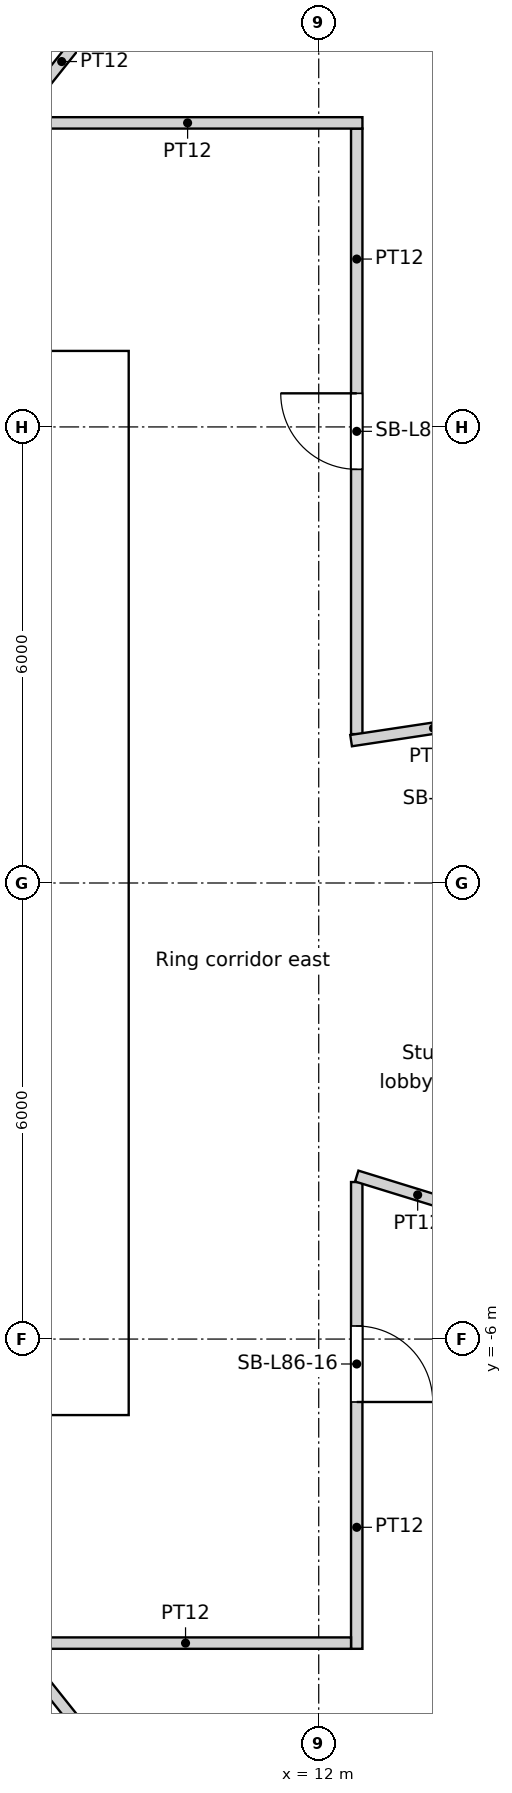
"""IFC4 building model, lengths in metres.
Left out: names, types, materials, properties, quantities, classifications, styles, units other than length and angle.
Written with IfcOpenShell. Run it as: python <this file> out.ifc"""

import sys

from ifc_helpers import new_model, si_unit, direction, frame, frame_2d, origin, place, context, subcontext, project, spatial, rectangle, extrude, element, fill, save


model = new_model("IFC4")
c1 = context("Model", 3, precision=1e-05, world=origin(), true_north=direction((0.0, 1.0)))
c2 = subcontext(c1, "Body", "Model", "MODEL_VIEW")
j1 = project(units=[si_unit("LENGTHUNIT", "METRE"), si_unit("PLANEANGLEUNIT", "RADIAN")], contexts=[c1])
p1 = place(None, origin())
s1 = spatial("IfcSite", under=j1, at=p1, CompositionType="ELEMENT")
p2 = place(p1, origin())
s2 = spatial("IfcBuilding", under=s1, at=p2, CompositionType="ELEMENT")
p3 = place(p2, frame((0.0, 0.0, 330.6)))
s3 = spatial("IfcBuildingStorey", under=s2, at=p3, CompositionType="ELEMENT", Elevation=330.6)
p4 = place(p3, frame((-9.5, -6.7, 0.0), z_axis=(0.0, 0.0, 1.0), x_axis=(1.0, 0.0, 0.0)))
e1 = element("IfcWall", 1, at=p4, inside=s3, PredefinedType="SOLIDWALL", context=c2, shape_type="SweptSolid", body=[
    extrude(rectangle(XDim=19.0, YDim=0.6, at=frame_2d((9.5, 0.0))), origin(), (0.0, 0.0, 1.0), 5.4),
])
p5 = place(p4, frame((10.4, 0.0, 0.0)))
e2 = element("IfcOpeningElement", 2, at=p5, cuts=e1, PredefinedType="OPENING", context=c2, shape_type="SweptSolid", body=[
    extrude(rectangle(XDim=1.0, YDim=2.1, at=frame_2d((0.5, 1.05))), frame((0.0, 0.3, 0.0), z_axis=(0.0, -1.0, 0.0), x_axis=(1.0, 0.0, 0.0)), (0.0, 0.0, 1.0), 0.6),
])
p6 = place(p4, frame((5.35, 0.0, 0.0)))
e3 = element("IfcOpeningElement", 3, at=p6, cuts=e1, PredefinedType="OPENING", context=c2, shape_type="SweptSolid", body=[
    extrude(rectangle(XDim=1.7, YDim=2.1, at=frame_2d((0.85, 1.05))), frame((0.0, 0.3, 0.0), z_axis=(0.0, -1.0, 0.0), x_axis=(1.0, 0.0, 0.0)), (0.0, 0.0, 1.0), 0.6),
])
p7 = place(p4, frame((11.95, 0.0, 0.0)))
e4 = element("IfcOpeningElement", 4, at=p7, cuts=e1, PredefinedType="OPENING", context=c2, shape_type="SweptSolid", body=[
    extrude(rectangle(XDim=1.7, YDim=2.1, at=frame_2d((0.85, 1.05))), frame((0.0, 0.3, 0.0), z_axis=(0.0, -1.0, 0.0), x_axis=(1.0, 0.0, 0.0)), (0.0, 0.0, 1.0), 0.6),
])
p8 = place(p3, frame((-9.5, 6.7, 0.0), z_axis=(0.0, 0.0, 1.0), x_axis=(1.0, 0.0, 0.0)))
e5 = element("IfcWall", 5, at=p8, inside=s3, PredefinedType="SOLIDWALL", context=c2, shape_type="SweptSolid", body=[
    extrude(rectangle(XDim=19.0, YDim=0.6, at=frame_2d((9.5, 0.0))), origin(), (0.0, 0.0, 1.0), 5.4),
])
p9 = place(p8, frame((5.35, 0.0, 0.0)))
e6 = element("IfcOpeningElement", 6, at=p9, cuts=e5, PredefinedType="OPENING", context=c2, shape_type="SweptSolid", body=[
    extrude(rectangle(XDim=1.7, YDim=2.1, at=frame_2d((0.85, 1.05))), frame((0.0, 0.3, 0.0), z_axis=(0.0, -1.0, 0.0), x_axis=(1.0, 0.0, 0.0)), (0.0, 0.0, 1.0), 0.6),
])
p10 = place(p3, frame((9.2, -6.4, 0.0), z_axis=(0.0, 0.0, 1.0), x_axis=(0.0, 1.0, 0.0)))
e7 = element("IfcWall", 7, at=p10, inside=s3, PredefinedType="SOLIDWALL", context=c2, shape_type="SweptSolid", body=[
    extrude(rectangle(XDim=12.8, YDim=0.6, at=frame_2d((6.4, 0.0))), origin(), (0.0, 0.0, 1.0), 5.4),
])
p11 = place(p10, frame((6.4, 0.0, 0.0)))
e8 = element("IfcOpeningElement", 8, at=p11, cuts=e7, PredefinedType="OPENING", context=c2, shape_type="SweptSolid", body=[
    extrude(rectangle(XDim=1.8, YDim=2.1, at=frame_2d((0.9, 1.05))), frame((0.0, 0.3, 0.0), z_axis=(0.0, -1.0, 0.0), x_axis=(1.0, 0.0, 0.0)), (0.0, 0.0, 1.0), 0.6),
])
p12 = place(p3, frame((2.1, -3.1, 0.0), z_axis=(0.0, 0.0, 1.0), x_axis=(1.0, 0.0, 0.0)))
e9 = element("IfcWall", 9, at=p12, inside=s3, PredefinedType="SOLIDWALL", context=c2, shape_type="SweptSolid", body=[
    extrude(rectangle(XDim=6.8, YDim=0.3, at=frame_2d((3.4, 0.0))), origin(), (0.0, 0.0, 1.0), 5.05),
])
p13 = place(p12, frame((0.35, 0.0, 0.0)))
e10 = element("IfcOpeningElement", 10, at=p13, cuts=e9, PredefinedType="OPENING", context=c2, shape_type="SweptSolid", body=[
    extrude(rectangle(XDim=1.7, YDim=2.1, at=frame_2d((0.85, 1.05))), frame((0.0, 0.15, 0.0), z_axis=(0.0, -1.0, 0.0), x_axis=(1.0, 0.0, 0.0)), (0.0, 0.0, 1.0), 0.3),
])
p14 = place(p3, frame((-4.35, 3.1, 0.0), z_axis=(0.0, 0.0, 1.0), x_axis=(1.0, 0.0, 0.0)))
e11 = element("IfcWall", 11, at=p14, inside=s3, PredefinedType="SOLIDWALL", context=c2, shape_type="SweptSolid", body=[
    extrude(rectangle(XDim=13.25, YDim=0.3, at=frame_2d((6.625, 0.0))), origin(), (0.0, 0.0, 1.0), 5.05),
])
p15 = place(p14, frame((2.95, 0.0, 0.0)))
e12 = element("IfcOpeningElement", 12, at=p15, cuts=e11, PredefinedType="OPENING", context=c2, shape_type="SweptSolid", body=[
    extrude(rectangle(XDim=1.1, YDim=2.1, at=frame_2d((0.55, 1.05))), frame((0.0, 0.15, 0.0), z_axis=(0.0, -1.0, 0.0), x_axis=(1.0, 0.0, 0.0)), (0.0, 0.0, 1.0), 0.3),
])
p16 = place(p14, frame((5.75, 0.0, 0.0)))
e13 = element("IfcOpeningElement", 13, at=p16, cuts=e11, PredefinedType="OPENING", context=c2, shape_type="SweptSolid", body=[
    extrude(rectangle(XDim=1.1, YDim=2.1, at=frame_2d((0.55, 1.05))), frame((0.0, 0.15, 0.0), z_axis=(0.0, -1.0, 0.0), x_axis=(1.0, 0.0, 0.0)), (0.0, 0.0, 1.0), 0.3),
])
p17 = place(p14, frame((8.55, 0.0, 0.0)))
e14 = element("IfcOpeningElement", 14, at=p17, cuts=e11, PredefinedType="OPENING", context=c2, shape_type="SweptSolid", body=[
    extrude(rectangle(XDim=1.1, YDim=2.1, at=frame_2d((0.55, 1.05))), frame((0.0, 0.15, 0.0), z_axis=(0.0, -1.0, 0.0), x_axis=(1.0, 0.0, 0.0)), (0.0, 0.0, 1.0), 0.3),
])
p18 = place(p3, frame((5.85, -0.425, 0.0), z_axis=(0.0, 0.0, 1.0), x_axis=(1.0, 0.0, 0.0)))
e15 = element("IfcWall", 15, at=p18, inside=s3, PredefinedType="SOLIDWALL", context=c2, shape_type="SweptSolid", body=[
    extrude(rectangle(XDim=3.05, YDim=0.15, at=frame_2d((1.525, 0.0))), origin(), (0.0, 0.0, 1.0), 5.05),
])
p19 = place(p18, frame((0.525, 0.0, 0.0)))
e16 = element("IfcOpeningElement", 16, at=p19, cuts=e15, PredefinedType="OPENING", context=c2, shape_type="SweptSolid", body=[
    extrude(rectangle(XDim=0.9, YDim=2.1, at=frame_2d((0.45, 1.05))), frame((0.0, 0.075, 0.0), z_axis=(0.0, -1.0, 0.0), x_axis=(1.0, 0.0, 0.0)), (0.0, 0.0, 1.0), 0.15),
])
p20 = place(p18, frame((2.05, 0.0, 0.0)))
e17 = element("IfcOpeningElement", 17, at=p20, cuts=e15, PredefinedType="OPENING", context=c2, shape_type="SweptSolid", body=[
    extrude(rectangle(XDim=0.9, YDim=2.1, at=frame_2d((0.45, 1.05))), frame((0.0, 0.075, 0.0), z_axis=(0.0, -1.0, 0.0), x_axis=(1.0, 0.0, 0.0)), (0.0, 0.0, 1.0), 0.15),
])
p21 = place(p3, frame((8.071, -10.0, 0.0), z_axis=(0.0, 0.0, 1.0), x_axis=(1.0, 0.0, 0.0)))
e18 = element("IfcWall", 18, at=p21, inside=s3, PredefinedType="PARTITIONING", context=c2, shape_type="SweptSolid", body=[
    extrude(rectangle(XDim=4.354, YDim=0.15, at=frame_2d((2.177, 0.0))), origin(), (0.0, 0.0, 1.0), 4.6),
])
p22 = place(p3, frame((9.202, 11.539, 0.0), z_axis=(0.0, 0.0, 1.0), x_axis=(-0.623517661876, -0.781809264034, 0.0)))
e19 = element("IfcWall", 19, at=p22, inside=s3, PredefinedType="PARTITIONING", context=c2, shape_type="SweptSolid", body=[
    extrude(rectangle(XDim=1.872, YDim=0.15, at=frame_2d((0.936, 0.0))), origin(), (0.0, 0.0, 1.0), 4.6),
])
p23 = place(p3, frame((10.196, -12.785, 0.0), z_axis=(0.0, 0.0, 1.0), x_axis=(-0.623516027281, 0.781810567672, 0.0)))
e20 = element("IfcWall", 20, at=p23, inside=s3, PredefinedType="PARTITIONING", context=c2, shape_type="SweptSolid", body=[
    extrude(rectangle(XDim=3.563, YDim=0.15, at=frame_2d((1.781, 0.0))), origin(), (0.0, 0.0, 1.0), 4.6),
])
p24 = place(p3, frame((12.5, -3.934, 0.0), z_axis=(0.0, 0.0, 1.0), x_axis=(0.0, -1.0, 0.0)))
e21 = element("IfcWall", 21, at=p24, inside=s3, PredefinedType="PARTITIONING", context=c2, shape_type="SweptSolid", body=[
    extrude(rectangle(XDim=6.141, YDim=0.15, at=frame_2d((3.07, 0.0))), origin(), (0.0, 0.0, 1.0), 4.6),
])
p25 = place(p24, frame((1.894, 0.0, 0.0)))
e22 = element("IfcOpeningElement", 22, at=p25, cuts=e21, PredefinedType="OPENING", context=c2, shape_type="SweptSolid", body=[
    extrude(rectangle(XDim=1.0, YDim=2.1, at=frame_2d((0.5, 1.05))), frame((0.0, 0.075, 0.0), z_axis=(0.0, -1.0, 0.0), x_axis=(1.0, 0.0, 0.0)), (0.0, 0.0, 1.0), 0.15),
])
p26 = place(p3, frame((12.5, 9.925, 0.0), z_axis=(0.0, 0.0, 1.0), x_axis=(0.0, -1.0, 0.0)))
e23 = element("IfcWall", 23, at=p26, inside=s3, PredefinedType="PARTITIONING", context=c2, shape_type="SweptSolid", body=[
    extrude(rectangle(XDim=7.966, YDim=0.15, at=frame_2d((3.983, 0.0))), origin(), (0.0, 0.0, 1.0), 4.6),
])
p27 = place(p26, frame((3.483, 0.0, 0.0)))
e24 = element("IfcOpeningElement", 24, at=p27, cuts=e23, PredefinedType="OPENING", context=c2, shape_type="SweptSolid", body=[
    extrude(rectangle(XDim=1.0, YDim=2.1, at=frame_2d((0.5, 1.05))), frame((0.0, 0.075, 0.0), z_axis=(0.0, -1.0, 0.0), x_axis=(1.0, 0.0, 0.0)), (0.0, 0.0, 1.0), 0.15),
])
p28 = place(p3, frame((12.575, 10.0, 0.0), z_axis=(0.0, 0.0, 1.0), x_axis=(-1.0, 0.0, 0.0)))
e25 = element("IfcWall", 25, at=p28, inside=s3, PredefinedType="PARTITIONING", context=c2, shape_type="SweptSolid", body=[
    extrude(rectangle(XDim=4.6, YDim=0.15, at=frame_2d((2.3, 0.0))), origin(), (0.0, 0.0, 1.0), 4.6),
])
p29 = place(p3, frame((14.103, -4.35, 0.0), z_axis=(0.0, 0.0, 1.0), x_axis=(-0.955586855456, 0.294709622647, 0.0)))
e26 = element("IfcWall", 26, at=p29, inside=s3, PredefinedType="PARTITIONING", context=c2, shape_type="SweptSolid", body=[
    extrude(rectangle(XDim=1.677, YDim=0.15, at=frame_2d((0.839, 0.0))), origin(), (0.0, 0.0, 1.0), 4.6),
])
p30 = place(p3, frame((14.594, 2.2, 0.0), z_axis=(0.0, 0.0, 1.0), x_axis=(-0.988824185574, -0.149086317361, 0.0)))
e27 = element("IfcWall", 27, at=p30, inside=s3, PredefinedType="PARTITIONING", context=c2, shape_type="SweptSolid", body=[
    extrude(rectangle(XDim=2.193, YDim=0.15, at=frame_2d((1.096, 0.0))), origin(), (0.0, 0.0, 1.0), 4.6),
])
p31 = place(p11, origin())
e28 = element("IfcDoor", 28, at=p31, inside=s3, OperationType="DOUBLE_DOOR_SINGLE_SWING", PredefinedType="DOOR", context=c2, shape_type="SweptSolid", body=[
    extrude(rectangle(XDim=1.8, YDim=2.1, at=frame_2d((0.9, 1.05))), frame((0.0, 0.025, 0.0), z_axis=(0.0, -1.0, 0.0), x_axis=(1.0, 0.0, 0.0)), (0.0, 0.0, 1.0), 0.05),
])
fill(e8, e28)
p32 = place(p20, origin())
e29 = element("IfcDoor", 29, at=p32, inside=s3, OperationType="SINGLE_SWING_LEFT", PredefinedType="DOOR", context=c2, shape_type="SweptSolid", body=[
    extrude(rectangle(XDim=0.9, YDim=2.1, at=frame_2d((0.45, 1.05))), frame((0.0, 0.025, 0.0), z_axis=(0.0, -1.0, 0.0), x_axis=(1.0, 0.0, 0.0)), (0.0, 0.0, 1.0), 0.05),
])
fill(e17, e29)
p33 = place(p27, origin())
e30 = element("IfcDoor", 30, at=p33, inside=s3, OperationType="SINGLE_SWING_RIGHT", PredefinedType="DOOR", context=c2, shape_type="SweptSolid", body=[
    extrude(rectangle(XDim=1.0, YDim=2.1, at=frame_2d((0.5, 1.05))), frame((0.0, 0.025, 0.0), z_axis=(0.0, -1.0, 0.0), x_axis=(1.0, 0.0, 0.0)), (0.0, 0.0, 1.0), 0.05),
])
fill(e24, e30)
p34 = place(p25, origin())
e31 = element("IfcDoor", 31, at=p34, inside=s3, OperationType="SINGLE_SWING_RIGHT", PredefinedType="DOOR", context=c2, shape_type="SweptSolid", body=[
    extrude(rectangle(XDim=1.0, YDim=2.1, at=frame_2d((0.5, 1.05))), frame((0.0, 0.025, 0.0), z_axis=(0.0, -1.0, 0.0), x_axis=(1.0, 0.0, 0.0)), (0.0, 0.0, 1.0), 0.05),
])
fill(e22, e31)
save(model, sys.argv[1])
